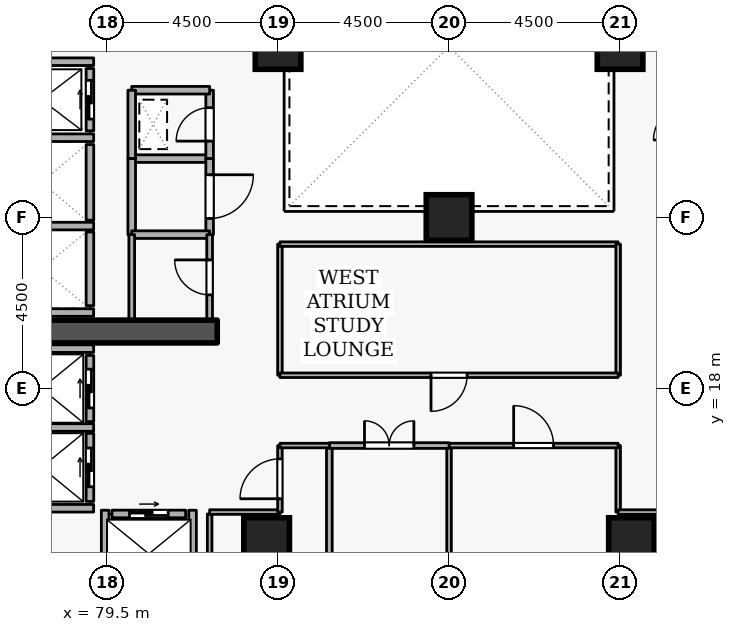
"""IFC4 building model, lengths in metres.
Left out: names, types, materials, properties, quantities, classifications, styles, units other than length and angle.
Written with IfcOpenShell. Run it as: python <this file> out.ifc"""

import sys

from ifc_helpers import new_model, si_unit, direction, frame, frame_2d, origin, origin_2d, place, context, subcontext, project, spatial, rectangle, extrude, element, fill, save


model = new_model("IFC4")
c1 = context("Model", 3, precision=1e-05, world=origin(), true_north=direction((0.0, 1.0)))
c2 = subcontext(c1, "Body", "Model", "MODEL_VIEW")
j1 = project(units=[si_unit("LENGTHUNIT", "METRE"), si_unit("PLANEANGLEUNIT", "RADIAN")], contexts=[c1])
p1 = place(None, origin())
s1 = spatial("IfcSite", under=j1, at=p1, CompositionType="ELEMENT")
p2 = place(p1, origin())
s2 = spatial("IfcBuilding", under=s1, at=p2, CompositionType="ELEMENT")
p3 = place(p2, frame((0.0, 0.0, 112.5)))
s3 = spatial("IfcBuildingStorey", under=s2, at=p3, CompositionType="ELEMENT", Elevation=112.5)
p4 = place(p3, frame((76.7, 19.5, 0.0), z_axis=(0.0, 0.0, 1.0), x_axis=(1.0, 0.0, 0.0)))
e1 = element("IfcWall", 1, at=p4, inside=s3, PredefinedType="SHEAR", context=c2, shape_type="SweptSolid", body=[
    extrude(rectangle(XDim=5.7, YDim=0.6, at=frame_2d((2.85, 0.0))), origin(), (0.0, 0.0, 1.0), 3.6),
])
for number, where, z_axis, x_axis in (
    (2, (93.3, 14.0, 0.0), (0.0, 0.0, 1.0), (1.0, 0.0, 0.0)),
    (3, (83.7, 14.0, 0.0), (0.0, 0.0, 1.0), (1.0, 0.0, 0.0)),
    (4, (93.0, 27.0, 0.0), (0.0, 0.0, 1.0), (1.0, 0.0, 0.0)),
    (5, (84.0, 27.0, 0.0), (0.0, 0.0, 1.0), (1.0, 0.0, 0.0)),
    (6, (88.5, 22.5, 0.0), (0.0, 0.0, 1.0), (1.0, 0.0, 0.0)),
):
    element("IfcColumn", number, at=place(p3, frame(where, z_axis=z_axis, x_axis=x_axis)), inside=s3, PredefinedType="COLUMN", context=c2, shape_type="SweptSolid", body=[
        extrude(rectangle(XDim=1.2, YDim=1.2, at=origin_2d()), origin(), (0.0, 0.0, 1.0), 3.6),
    ])
p5 = place(p3, frame((79.05, 24.78, 0.0), z_axis=(0.0, 0.0, 1.0), x_axis=(0.0, 1.0, 0.0)))
e7 = element("IfcWall", 7, at=p5, inside=s3, PredefinedType="STANDARD", context=c2, shape_type="SweptSolid", body=[
    extrude(rectangle(XDim=1.64, YDim=0.2, at=frame_2d((0.82, 0.0))), origin(), (0.0, 0.0, 1.0), 3.34),
])
p6 = place(p5, frame((0.31, 0.0, 0.0)))
e8 = element("IfcOpeningElement", 8, at=p6, cuts=e7, PredefinedType="OPENING", context=c2, shape_type="SweptSolid", body=[
    extrude(rectangle(XDim=1.02, YDim=2.06, at=frame_2d((0.51, 1.03))), frame((0.0, 0.11, 0.0), z_axis=(0.0, -1.0, 0.0), x_axis=(1.0, 0.0, 0.0)), (0.0, 0.0, 1.0), 0.22),
])
p7 = place(p3, frame((79.05, 22.43, 0.0), z_axis=(0.0, 0.0, 1.0), x_axis=(0.0, 1.0, 0.0)))
e9 = element("IfcWall", 9, at=p7, inside=s3, PredefinedType="STANDARD", context=c2, shape_type="SweptSolid", body=[
    extrude(rectangle(XDim=1.99, YDim=0.2, at=frame_2d((0.995, 0.0))), origin(), (0.0, 0.0, 1.0), 3.34),
])
p8 = place(p3, frame((79.05, 20.18, 0.0), z_axis=(0.0, 0.0, 1.0), x_axis=(0.0, 1.0, 0.0)))
e10 = element("IfcWall", 10, at=p8, inside=s3, PredefinedType="STANDARD", context=c2, shape_type="SweptSolid", body=[
    extrude(rectangle(XDim=1.94, YDim=0.2, at=frame_2d((0.97, 0.0))), origin(), (0.0, 0.0, 1.0), 3.34),
])
p9 = place(p3, frame((79.05, 17.13, 0.0), z_axis=(0.0, 0.0, 1.0), x_axis=(0.0, 1.0, 0.0)))
e11 = element("IfcWall", 11, at=p9, inside=s3, PredefinedType="STANDARD", context=c2, shape_type="SweptSolid", body=[
    extrude(rectangle(XDim=1.74, YDim=0.2, at=frame_2d((0.87, 0.0))), origin(), (0.0, 0.0, 1.0), 3.34),
])
p10 = place(p9, frame((0.36, 0.0, 0.0)))
e12 = element("IfcOpeningElement", 12, at=p10, cuts=e11, PredefinedType="OPENING", context=c2, shape_type="SweptSolid", body=[
    extrude(rectangle(XDim=1.02, YDim=2.06, at=frame_2d((0.51, 1.03))), frame((0.0, 0.11, 0.0), z_axis=(0.0, -1.0, 0.0), x_axis=(1.0, 0.0, 0.0)), (0.0, 0.0, 1.0), 0.22),
])
p11 = place(p3, frame((79.05, 15.03, 0.0), z_axis=(0.0, 0.0, 1.0), x_axis=(0.0, 1.0, 0.0)))
e13 = element("IfcWall", 13, at=p11, inside=s3, PredefinedType="STANDARD", context=c2, shape_type="SweptSolid", body=[
    extrude(rectangle(XDim=1.79, YDim=0.2, at=frame_2d((0.895, 0.0))), origin(), (0.0, 0.0, 1.0), 3.34),
])
p12 = place(p11, frame((0.385, 0.0, 0.0)))
e14 = element("IfcOpeningElement", 14, at=p12, cuts=e13, PredefinedType="OPENING", context=c2, shape_type="SweptSolid", body=[
    extrude(rectangle(XDim=1.02, YDim=2.06, at=frame_2d((0.51, 1.03))), frame((0.0, 0.11, 0.0), z_axis=(0.0, -1.0, 0.0), x_axis=(1.0, 0.0, 0.0)), (0.0, 0.0, 1.0), 0.22),
])
p13 = place(p3, frame((79.63, 14.7, 0.0), z_axis=(0.0, 0.0, 1.0), x_axis=(1.0, 0.0, 0.0)))
e15 = element("IfcWall", 15, at=p13, inside=s3, PredefinedType="STANDARD", context=c2, shape_type="SweptSolid", body=[
    extrude(rectangle(XDim=1.94, YDim=0.2, at=frame_2d((0.97, 0.0))), origin(), (0.0, 0.0, 1.0), 3.34),
])
p14 = place(p13, frame((0.46, 0.0, 0.0)))
e16 = element("IfcOpeningElement", 16, at=p14, cuts=e15, PredefinedType="OPENING", context=c2, shape_type="SweptSolid", body=[
    extrude(rectangle(XDim=1.02, YDim=2.06, at=frame_2d((0.51, 1.03))), frame((0.0, 0.11, 0.0), z_axis=(0.0, -1.0, 0.0), x_axis=(1.0, 0.0, 0.0)), (0.0, 0.0, 1.0), 0.22),
])
for number, where, z_axis, x_axis in (
    (17, (76.712, 26.6, 0.0), (0.0, 0.0, 1.0), (1.0, 0.0, 0.0)),
    (18, (76.712, 24.6, 0.0), (0.0, 0.0, 1.0), (1.0, 0.0, 0.0)),
    (19, (76.712, 22.275, 0.0), (0.0, 0.0, 1.0), (1.0, 0.0, 0.0)),
    (20, (76.712, 20.0, 0.0), (0.0, 0.0, 1.0), (1.0, 0.0, 0.0)),
):
    element("IfcWall", number, at=place(p3, frame(where, z_axis=z_axis, x_axis=x_axis)), inside=s3, PredefinedType="STANDARD", context=c2, shape_type="SweptSolid", body=[
        extrude(rectangle(XDim=2.436, YDim=0.2, at=frame_2d((1.218, 0.0))), origin(), (0.0, 0.0, 1.0), 3.34),
    ])
p15 = place(p3, frame((76.402, 19.05, 0.0), z_axis=(0.0, 0.0, 1.0), x_axis=(1.0, 0.0, 0.0)))
e21 = element("IfcWall", 21, at=p15, inside=s3, PredefinedType="STANDARD", context=c2, shape_type="SweptSolid", body=[
    extrude(rectangle(XDim=2.746, YDim=0.2, at=frame_2d((1.373, 0.0))), origin(), (0.0, 0.0, 1.0), 2.545),
])
p16 = place(p3, frame((76.402, 16.975, 0.0), z_axis=(0.0, 0.0, 1.0), x_axis=(1.0, 0.0, 0.0)))
e22 = element("IfcWall", 22, at=p16, inside=s3, PredefinedType="STANDARD", context=c2, shape_type="SweptSolid", body=[
    extrude(rectangle(XDim=2.746, YDim=0.2, at=frame_2d((1.373, 0.0))), origin(), (0.0, 0.0, 1.0), 3.34),
])
p17 = place(p3, frame((76.512, 14.85, 0.0), z_axis=(0.0, 0.0, 1.0), x_axis=(1.0, 0.0, 0.0)))
e23 = element("IfcWall", 23, at=p17, inside=s3, PredefinedType="STANDARD", context=c2, shape_type="SweptSolid", body=[
    extrude(rectangle(XDim=2.636, YDim=0.2, at=frame_2d((1.318, 0.0))), origin(), (0.0, 0.0, 1.0), 3.34),
])
for number, where, z_axis, x_axis in (
    (24, (81.75, 12.612, 0.0), (0.0, 0.0, 1.0), (0.0, 1.0, 0.0)),
    (25, (79.45, 12.612, 0.0), (0.0, 0.0, 1.0), (0.0, 1.0, 0.0)),
):
    element("IfcWall", number, at=place(p3, frame(where, z_axis=z_axis, x_axis=x_axis)), inside=s3, PredefinedType="STANDARD", context=c2, shape_type="SweptSolid", body=[
        extrude(rectangle(XDim=2.186, YDim=0.2, at=frame_2d((1.093, 0.0))), origin(), (0.0, 0.0, 1.0), 3.34),
    ])
p18 = place(p3, frame((80.15, 24.05, 0.0), z_axis=(0.0, 0.0, 1.0), x_axis=(1.0, 0.0, 0.0)))
e26 = element("IfcWall", 26, at=p18, inside=s3, PredefinedType="STANDARD", context=c2, shape_type="SweptSolid", body=[
    extrude(rectangle(XDim=2.05, YDim=0.2, at=frame_2d((1.025, 0.0))), origin(), (0.0, 0.0, 1.0), 3.34),
])
p19 = place(p3, frame((82.2, 24.05, 0.0), z_axis=(0.0, 0.0, 1.0), x_axis=(0.0, 1.0, 0.0)))
e27 = element("IfcWall", 27, at=p19, inside=s3, PredefinedType="STANDARD", context=c2, shape_type="SweptSolid", body=[
    extrude(rectangle(XDim=1.8, YDim=0.2, at=frame_2d((0.9, 0.0))), origin(), (0.0, 0.0, 1.0), 3.34),
])
p20 = place(p19, frame((0.46, 0.0, 0.0)))
e28 = element("IfcOpeningElement", 28, at=p20, cuts=e27, PredefinedType="OPENING", context=c2, shape_type="SweptSolid", body=[
    extrude(rectangle(XDim=0.88, YDim=2.04, at=frame_2d((0.44, 1.02))), frame((0.0, 0.11, 0.0), z_axis=(0.0, -1.0, 0.0), x_axis=(1.0, 0.0, 0.0)), (0.0, 0.0, 1.0), 0.22),
])
p21 = place(p3, frame((82.2, 25.85, 0.0), z_axis=(0.0, 0.0, 1.0), x_axis=(-1.0, 0.0, 0.0)))
e29 = element("IfcWall", 29, at=p21, inside=s3, PredefinedType="STANDARD", context=c2, shape_type="SweptSolid", body=[
    extrude(rectangle(XDim=2.05, YDim=0.2, at=frame_2d((1.025, 0.0))), origin(), (0.0, 0.0, 1.0), 3.34),
])
p22 = place(p3, frame((80.15, 25.85, 0.0), z_axis=(0.0, 0.0, 1.0), x_axis=(0.0, -1.0, 0.0)))
e30 = element("IfcWall", 30, at=p22, inside=s3, PredefinedType="STANDARD", context=c2, shape_type="SweptSolid", body=[
    extrude(rectangle(XDim=1.8, YDim=0.2, at=frame_2d((0.9, 0.0))), origin(), (0.0, 0.0, 1.0), 3.34),
])
p23 = place(p3, frame((80.15, 22.05, 0.0), z_axis=(0.0, 0.0, 1.0), x_axis=(0.0, 1.0, 0.0)))
e31 = element("IfcWall", 31, at=p23, inside=s3, PredefinedType="STANDARD", context=c2, shape_type="SweptSolid", body=[
    extrude(rectangle(XDim=2.0, YDim=0.2, at=frame_2d((1.0, 0.0))), origin(), (0.0, 0.0, 1.0), 3.34),
])
p24 = place(p3, frame((82.2, 24.05, 0.0), z_axis=(0.0, 0.0, 1.0), x_axis=(0.0, -1.0, 0.0)))
e32 = element("IfcWall", 32, at=p24, inside=s3, PredefinedType="STANDARD", context=c2, shape_type="SweptSolid", body=[
    extrude(rectangle(XDim=2.0, YDim=0.2, at=frame_2d((1.0, 0.0))), origin(), (0.0, 0.0, 1.0), 3.34),
])
p25 = place(p24, frame((0.425, 0.0, 0.0)))
e33 = element("IfcOpeningElement", 33, at=p25, cuts=e32, PredefinedType="OPENING", context=c2, shape_type="SweptSolid", body=[
    extrude(rectangle(XDim=1.15, YDim=2.1, at=frame_2d((0.575, 1.05))), frame((0.0, 0.11, 0.0), z_axis=(0.0, -1.0, 0.0), x_axis=(1.0, 0.0, 0.0)), (0.0, 0.0, 1.0), 0.22),
])
p26 = place(p3, frame((82.2, 22.05, 0.0), z_axis=(0.0, 0.0, 1.0), x_axis=(-1.0, 0.0, 0.0)))
e34 = element("IfcWall", 34, at=p26, inside=s3, PredefinedType="STANDARD", context=c2, shape_type="SweptSolid", body=[
    extrude(rectangle(XDim=2.05, YDim=0.2, at=frame_2d((1.025, 0.0))), origin(), (0.0, 0.0, 1.0), 3.34),
])
p27 = place(p3, frame((82.2, 19.8, 0.0), z_axis=(0.0, 0.0, 1.0), x_axis=(0.0, 1.0, 0.0)))
e35 = element("IfcWall", 35, at=p27, inside=s3, PredefinedType="PARTITIONING", context=c2, shape_type="SweptSolid", body=[
    extrude(rectangle(XDim=2.25, YDim=0.15, at=frame_2d((1.125, 0.0))), origin(), (0.0, 0.0, 1.0), 3.34),
])
p28 = place(p27, frame((0.665, 0.0, 0.0)))
e36 = element("IfcOpeningElement", 36, at=p28, cuts=e35, PredefinedType="OPENING", context=c2, shape_type="SweptSolid", body=[
    extrude(rectangle(XDim=0.92, YDim=2.08, at=frame_2d((0.46, 1.04))), frame((0.0, 0.085, 0.0), z_axis=(0.0, -1.0, 0.0), x_axis=(1.0, 0.0, 0.0)), (0.0, 0.0, 1.0), 0.17),
])
p29 = place(p3, frame((80.15, 22.05, 0.0), z_axis=(0.0, 0.0, 1.0), x_axis=(0.0, -1.0, 0.0)))
e37 = element("IfcWall", 37, at=p29, inside=s3, PredefinedType="PARTITIONING", context=c2, shape_type="SweptSolid", body=[
    extrude(rectangle(XDim=2.25, YDim=0.15, at=frame_2d((1.125, 0.0))), origin(), (0.0, 0.0, 1.0), 3.34),
])
p30 = place(p3, frame((92.95, 16.5, 0.0), z_axis=(0.0, 0.0, 1.0), x_axis=(0.0, -1.0, 0.0)))
e38 = element("IfcWall", 38, at=p30, inside=s3, PredefinedType="PARTITIONING", context=c2, shape_type="SweptSolid", body=[
    extrude(rectangle(XDim=1.75, YDim=0.12, at=frame_2d((0.875, 0.0))), origin(), (0.0, 0.0, 1.0), 3.34),
])
p31 = place(p3, frame((92.95, 14.75, 0.0), z_axis=(0.0, 0.0, 1.0), x_axis=(1.0, 0.0, 0.0)))
e39 = element("IfcWall", 39, at=p31, inside=s3, PredefinedType="PARTITIONING", context=c2, shape_type="SweptSolid", body=[
    extrude(rectangle(XDim=1.85, YDim=0.12, at=frame_2d((0.925, 0.0))), origin(), (0.0, 0.0, 1.0), 3.34),
])
p32 = place(p3, frame((88.5, 9.7, 0.0), z_axis=(0.0, 0.0, 1.0), x_axis=(0.0, 1.0, 0.0)))
e40 = element("IfcWall", 40, at=p32, inside=s3, PredefinedType="PARTITIONING", context=c2, shape_type="SweptSolid", body=[
    extrude(rectangle(XDim=6.8, YDim=0.12, at=frame_2d((3.4, 0.0))), origin(), (0.0, 0.0, 1.0), 2.882),
])
p33 = place(p3, frame((88.5, 16.5, 0.0), z_axis=(0.0, 0.0, 1.0), x_axis=(1.0, 0.0, 0.0)))
e41 = element("IfcWall", 41, at=p33, inside=s3, PredefinedType="PARTITIONING", context=c2, shape_type="SweptSolid", body=[
    extrude(rectangle(XDim=4.45, YDim=0.12, at=frame_2d((2.225, 0.0))), origin(), (0.0, 0.0, 1.0), 3.34),
])
p34 = place(p33, frame((1.7, 0.0, 0.0)))
e42 = element("IfcOpeningElement", 42, at=p34, cuts=e41, PredefinedType="OPENING", context=c2, shape_type="SweptSolid", body=[
    extrude(rectangle(XDim=1.05, YDim=2.1, at=frame_2d((0.525, 1.05))), frame((0.0, 0.07, 0.0), z_axis=(0.0, -1.0, 0.0), x_axis=(1.0, 0.0, 0.0)), (0.0, 0.0, 1.0), 0.14),
])
p35 = place(p3, frame((85.35, 3.08, 0.0), z_axis=(0.0, 0.0, 1.0), x_axis=(0.0, 1.0, 0.0)))
e43 = element("IfcWall", 43, at=p35, inside=s3, PredefinedType="PARTITIONING", context=c2, shape_type="SweptSolid", body=[
    extrude(rectangle(XDim=13.42, YDim=0.15, at=frame_2d((6.71, 0.0))), origin(), (0.0, 0.0, 1.0), 3.34),
])
p36 = place(p3, frame((85.35, 16.5, 0.0), z_axis=(0.0, 0.0, 1.0), x_axis=(1.0, 0.0, 0.0)))
e44 = element("IfcWall", 44, at=p36, inside=s3, PredefinedType="PARTITIONING", context=c2, shape_type="SweptSolid", body=[
    extrude(rectangle(XDim=3.15, YDim=0.15, at=frame_2d((1.575, 0.0))), origin(), (0.0, 0.0, 1.0), 3.34),
])
p37 = place(p36, frame((0.925, 0.0, 0.0)))
e45 = element("IfcOpeningElement", 45, at=p37, cuts=e44, PredefinedType="OPENING", context=c2, shape_type="SweptSolid", body=[
    extrude(rectangle(XDim=1.3, YDim=2.12, at=frame_2d((0.65, 1.06))), frame((0.0, 0.085, 0.0), z_axis=(0.0, -1.0, 0.0), x_axis=(1.0, 0.0, 0.0)), (0.0, 0.0, 1.0), 0.17),
])
p38 = place(p3, frame((82.2, 12.4, 0.0), z_axis=(0.0, 0.0, 1.0), x_axis=(0.0, 1.0, 0.0)))
e46 = element("IfcWall", 46, at=p38, inside=s3, PredefinedType="PARTITIONING", context=c2, shape_type="SweptSolid", body=[
    extrude(rectangle(XDim=2.3, YDim=0.12, at=frame_2d((1.15, 0.0))), origin(), (0.0, 0.0, 1.0), 3.34),
])
p39 = place(p3, frame((82.2, 14.75, 0.0), z_axis=(0.0, 0.0, 1.0), x_axis=(1.0, 0.0, 0.0)))
e47 = element("IfcWall", 47, at=p39, inside=s3, PredefinedType="PARTITIONING", context=c2, shape_type="SweptSolid", body=[
    extrude(rectangle(XDim=1.85, YDim=0.12, at=frame_2d((0.925, 0.0))), origin(), (0.0, 0.0, 1.0), 3.34),
])
p40 = place(p3, frame((84.05, 14.75, 0.0), z_axis=(0.0, 0.0, 1.0), x_axis=(0.0, 1.0, 0.0)))
e48 = element("IfcWall", 48, at=p40, inside=s3, PredefinedType="PARTITIONING", context=c2, shape_type="SweptSolid", body=[
    extrude(rectangle(XDim=1.75, YDim=0.12, at=frame_2d((0.875, 0.0))), origin(), (0.0, 0.0, 1.0), 3.34),
])
p41 = place(p40, frame((0.35, 0.0, 0.0)))
e49 = element("IfcOpeningElement", 49, at=p41, cuts=e48, PredefinedType="OPENING", context=c2, shape_type="SweptSolid", body=[
    extrude(rectangle(XDim=1.05, YDim=2.1, at=frame_2d((0.525, 1.05))), frame((0.0, 0.07, 0.0), z_axis=(0.0, -1.0, 0.0), x_axis=(1.0, 0.0, 0.0)), (0.0, 0.0, 1.0), 0.14),
])
p42 = place(p3, frame((84.05, 16.5, 0.0), z_axis=(0.0, 0.0, 1.0), x_axis=(1.0, 0.0, 0.0)))
e50 = element("IfcWall", 50, at=p42, inside=s3, PredefinedType="PARTITIONING", context=c2, shape_type="SweptSolid", body=[
    extrude(rectangle(XDim=1.3, YDim=0.12, at=frame_2d((0.65, 0.0))), origin(), (0.0, 0.0, 1.0), 3.34),
])
p43 = place(p3, frame((84.05, 18.35, 0.0), z_axis=(0.0, 0.0, 1.0), x_axis=(0.0, 1.0, 0.0)))
e51 = element("IfcWall", 51, at=p43, inside=s3, PredefinedType="PARTITIONING", context=c2, shape_type="SweptSolid", body=[
    extrude(rectangle(XDim=3.45, YDim=0.12, at=frame_2d((1.725, 0.0))), origin(), (0.0, 0.0, 1.0), 3.34),
])
p44 = place(p3, frame((84.05, 21.8, 0.0), z_axis=(0.0, 0.0, 1.0), x_axis=(1.0, 0.0, 0.0)))
e52 = element("IfcWall", 52, at=p44, inside=s3, PredefinedType="PARTITIONING", context=c2, shape_type="SweptSolid", body=[
    extrude(rectangle(XDim=8.9, YDim=0.12, at=frame_2d((4.45, 0.0))), origin(), (0.0, 0.0, 1.0), 3.34),
])
p45 = place(p3, frame((92.95, 21.8, 0.0), z_axis=(0.0, 0.0, 1.0), x_axis=(0.0, -1.0, 0.0)))
e53 = element("IfcWall", 53, at=p45, inside=s3, PredefinedType="PARTITIONING", context=c2, shape_type="SweptSolid", body=[
    extrude(rectangle(XDim=3.45, YDim=0.12, at=frame_2d((1.725, 0.0))), origin(), (0.0, 0.0, 1.0), 3.34),
])
p46 = place(p3, frame((92.95, 18.35, 0.0), z_axis=(0.0, 0.0, 1.0), x_axis=(-1.0, 0.0, 0.0)))
e54 = element("IfcWall", 54, at=p46, inside=s3, PredefinedType="PARTITIONING", context=c2, shape_type="SweptSolid", body=[
    extrude(rectangle(XDim=8.9, YDim=0.12, at=frame_2d((4.45, 0.0))), origin(), (0.0, 0.0, 1.0), 3.34),
])
p47 = place(p46, frame((3.975, 0.0, 0.0)))
e55 = element("IfcOpeningElement", 55, at=p47, cuts=e54, PredefinedType="OPENING", context=c2, shape_type="SweptSolid", body=[
    extrude(rectangle(XDim=0.95, YDim=2.1, at=frame_2d((0.475, 1.05))), frame((0.0, 0.07, 0.0), z_axis=(0.0, -1.0, 0.0), x_axis=(1.0, 0.0, 0.0)), (0.0, 0.0, 1.0), 0.14),
])
p48 = place(p6, origin())
e56 = element("IfcDoor", 56, at=p48, inside=s3, OperationType="SLIDING_TO_LEFT", PredefinedType="DOOR", context=c2, shape_type="SweptSolid", body=[
    extrude(rectangle(XDim=1.02, YDim=2.06, at=frame_2d((0.51, 1.03))), frame((0.0, 0.025, 0.0), z_axis=(0.0, -1.0, 0.0), x_axis=(1.0, 0.0, 0.0)), (0.0, 0.0, 1.0), 0.05),
])
fill(e8, e56)
p49 = place(p10, origin())
e57 = element("IfcDoor", 57, at=p49, inside=s3, OperationType="SLIDING_TO_LEFT", PredefinedType="DOOR", context=c2, shape_type="SweptSolid", body=[
    extrude(rectangle(XDim=1.02, YDim=2.06, at=frame_2d((0.51, 1.03))), frame((0.0, 0.025, 0.0), z_axis=(0.0, -1.0, 0.0), x_axis=(1.0, 0.0, 0.0)), (0.0, 0.0, 1.0), 0.05),
])
fill(e12, e57)
p50 = place(p12, origin())
e58 = element("IfcDoor", 58, at=p50, inside=s3, OperationType="SLIDING_TO_LEFT", PredefinedType="DOOR", context=c2, shape_type="SweptSolid", body=[
    extrude(rectangle(XDim=1.02, YDim=2.06, at=frame_2d((0.51, 1.03))), frame((0.0, 0.025, 0.0), z_axis=(0.0, -1.0, 0.0), x_axis=(1.0, 0.0, 0.0)), (0.0, 0.0, 1.0), 0.05),
])
fill(e14, e58)
p51 = place(p14, origin())
e59 = element("IfcDoor", 59, at=p51, inside=s3, OperationType="SLIDING_TO_LEFT", PredefinedType="DOOR", context=c2, shape_type="SweptSolid", body=[
    extrude(rectangle(XDim=1.02, YDim=2.06, at=frame_2d((0.51, 1.03))), frame((0.0, 0.025, 0.0), z_axis=(0.0, -1.0, 0.0), x_axis=(1.0, 0.0, 0.0)), (0.0, 0.0, 1.0), 0.05),
])
fill(e16, e59)
p52 = place(p20, origin())
e60 = element("IfcDoor", 60, at=p52, inside=s3, OperationType="SINGLE_SWING_LEFT", PredefinedType="DOOR", context=c2, shape_type="SweptSolid", body=[
    extrude(rectangle(XDim=0.88, YDim=2.04, at=frame_2d((0.44, 1.02))), frame((0.0, 0.025, 0.0), z_axis=(0.0, -1.0, 0.0), x_axis=(1.0, 0.0, 0.0)), (0.0, 0.0, 1.0), 0.05),
])
fill(e28, e60)
p53 = place(p28, origin())
e61 = element("IfcDoor", 61, at=p53, inside=s3, OperationType="SINGLE_SWING_RIGHT", PredefinedType="DOOR", context=c2, shape_type="SweptSolid", body=[
    extrude(rectangle(XDim=0.92, YDim=2.08, at=frame_2d((0.46, 1.04))), frame((0.0, 0.025, 0.0), z_axis=(0.0, -1.0, 0.0), x_axis=(1.0, 0.0, 0.0)), (0.0, 0.0, 1.0), 0.05),
])
fill(e36, e61)
p54 = place(p25, origin())
e62 = element("IfcDoor", 62, at=p54, inside=s3, OperationType="SINGLE_SWING_LEFT", PredefinedType="DOOR", context=c2, shape_type="SweptSolid", body=[
    extrude(rectangle(XDim=1.15, YDim=2.1, at=frame_2d((0.575, 1.05))), frame((0.0, 0.025, 0.0), z_axis=(0.0, -1.0, 0.0), x_axis=(1.0, 0.0, 0.0)), (0.0, 0.0, 1.0), 0.05),
])
fill(e33, e62)
p55 = place(p34, origin())
e63 = element("IfcDoor", 63, at=p55, inside=s3, OperationType="SINGLE_SWING_LEFT", PredefinedType="DOOR", context=c2, shape_type="SweptSolid", body=[
    extrude(rectangle(XDim=1.05, YDim=2.1, at=frame_2d((0.525, 1.05))), frame((0.0, 0.025, 0.0), z_axis=(0.0, -1.0, 0.0), x_axis=(1.0, 0.0, 0.0)), (0.0, 0.0, 1.0), 0.05),
])
fill(e42, e63)
p56 = place(p37, origin())
e64 = element("IfcDoor", 64, at=p56, inside=s3, OperationType="DOUBLE_DOOR_SINGLE_SWING", PredefinedType="DOOR", context=c2, shape_type="SweptSolid", body=[
    extrude(rectangle(XDim=1.3, YDim=2.12, at=frame_2d((0.65, 1.06))), frame((0.0, 0.025, 0.0), z_axis=(0.0, -1.0, 0.0), x_axis=(1.0, 0.0, 0.0)), (0.0, 0.0, 1.0), 0.05),
])
fill(e45, e64)
p57 = place(p41, origin())
e65 = element("IfcDoor", 65, at=p57, inside=s3, OperationType="SINGLE_SWING_LEFT", PredefinedType="DOOR", context=c2, shape_type="SweptSolid", body=[
    extrude(rectangle(XDim=1.05, YDim=2.1, at=frame_2d((0.525, 1.05))), frame((0.0, 0.025, 0.0), z_axis=(0.0, -1.0, 0.0), x_axis=(1.0, 0.0, 0.0)), (0.0, 0.0, 1.0), 0.05),
])
fill(e49, e65)
p58 = place(p47, origin())
e66 = element("IfcDoor", 66, at=p58, inside=s3, OperationType="SINGLE_SWING_RIGHT", PredefinedType="DOOR", context=c2, shape_type="SweptSolid", body=[
    extrude(rectangle(XDim=0.95, YDim=2.1, at=frame_2d((0.475, 1.05))), frame((0.0, 0.025, 0.0), z_axis=(0.0, -1.0, 0.0), x_axis=(1.0, 0.0, 0.0)), (0.0, 0.0, 1.0), 0.05),
])
fill(e55, e66)
save(model, sys.argv[1])
